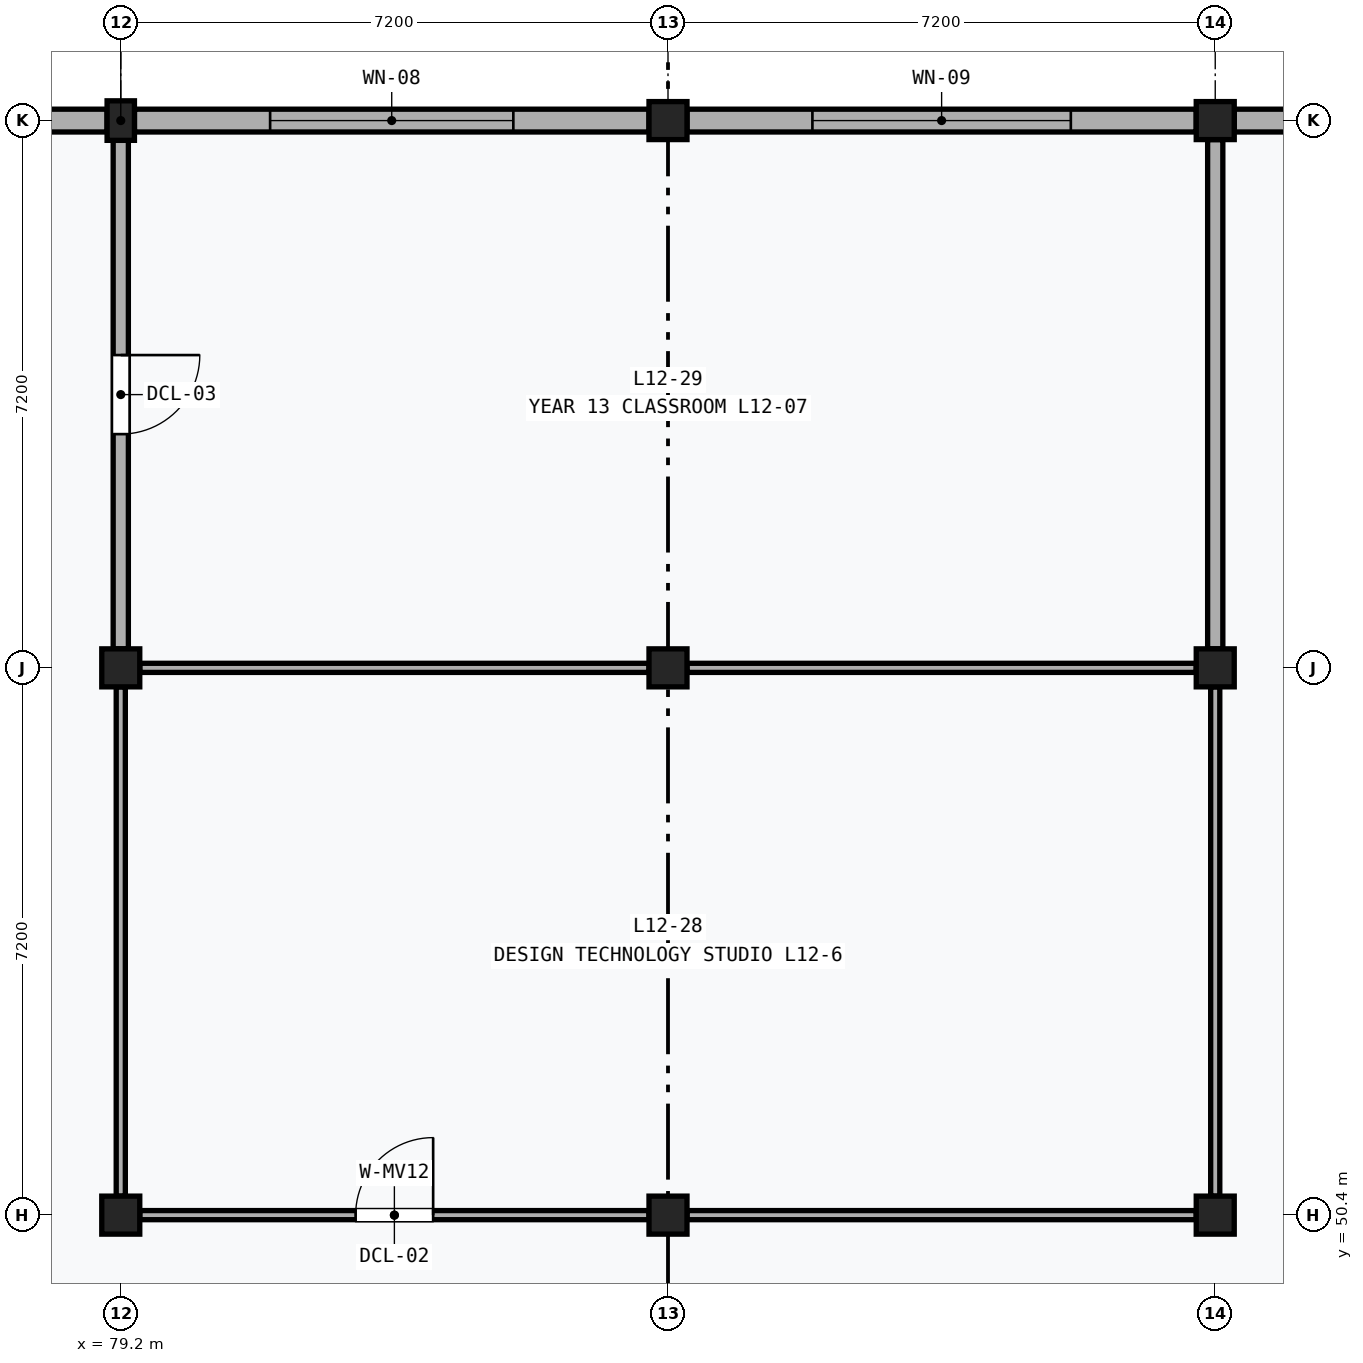
"""IFC4 building model, lengths in metres.
Left out: names, types, materials, properties, quantities, classifications, styles, units other than length and angle.
Written with IfcOpenShell. Run it as: python <this file> out.ifc"""

import sys

from ifc_helpers import new_model, si_unit, direction, frame, frame_2d, origin, origin_2d, place, context, subcontext, project, spatial, rectangle, extrude, element, fill, save


model = new_model("IFC4")
c1 = context("Model", 3, precision=1e-05, world=origin(), true_north=direction((0.0, 1.0)))
c2 = subcontext(c1, "Body", "Model", "MODEL_VIEW")
j1 = project(units=[si_unit("LENGTHUNIT", "METRE"), si_unit("PLANEANGLEUNIT", "RADIAN")], contexts=[c1])
p1 = place(None, origin())
s1 = spatial("IfcSite", under=j1, at=p1, CompositionType="ELEMENT")
p2 = place(p1, origin())
s2 = spatial("IfcBuilding", under=s1, at=p2, CompositionType="ELEMENT")
p3 = place(p2, frame((0.0, 0.0, 51.0)))
s3 = spatial("IfcBuildingStorey", under=s2, at=p3, CompositionType="ELEMENT", Elevation=51.0)
for number, where, z_axis, x_axis in (
    (1, (79.2, 50.4, 0.0), (0.0, 0.0, 1.0), (1.0, 0.0, 0.0)),
    (2, (79.2, 57.6, 0.0), (0.0, 0.0, 1.0), (1.0, 0.0, 0.0)),
):
    element("IfcColumn", number, at=place(p3, frame(where, z_axis=z_axis, x_axis=x_axis)), inside=s3, PredefinedType="COLUMN", context=c2, shape_type="SweptSolid", body=[
        extrude(rectangle(XDim=0.5, YDim=0.5, at=origin_2d()), origin(), (0.0, 0.0, 1.0), 4.0),
    ])
p4 = place(p3, frame((79.2, 64.8, 0.0), z_axis=(0.0, 0.0, 1.0), x_axis=(1.0, 0.0, 0.0)))
e3 = element("IfcColumn", 3, at=p4, inside=s3, PredefinedType="PILASTER", context=c2, shape_type="SweptSolid", body=[
    extrude(rectangle(XDim=0.36, YDim=0.52, at=origin_2d()), origin(), (0.0, 0.0, 1.0), 4.0),
])
for number, where, z_axis, x_axis in (
    (4, (86.4, 50.4, 0.0), (0.0, 0.0, 1.0), (1.0, 0.0, 0.0)),
    (5, (86.4, 57.6, 0.0), (0.0, 0.0, 1.0), (1.0, 0.0, 0.0)),
    (6, (86.4, 64.8, 0.0), (0.0, 0.0, 1.0), (1.0, 0.0, 0.0)),
    (7, (93.6, 50.4, 0.0), (0.0, 0.0, 1.0), (1.0, 0.0, 0.0)),
    (8, (93.6, 57.6, 0.0), (0.0, 0.0, 1.0), (1.0, 0.0, 0.0)),
    (9, (93.6, 64.8, 0.0), (0.0, 0.0, 1.0), (1.0, 0.0, 0.0)),
):
    element("IfcColumn", number, at=place(p3, frame(where, z_axis=z_axis, x_axis=x_axis)), inside=s3, PredefinedType="COLUMN", context=c2, shape_type="SweptSolid", body=[
        extrude(rectangle(XDim=0.5, YDim=0.5, at=origin_2d()), origin(), (0.0, 0.0, 1.0), 4.0),
    ])
p5 = place(p3, frame((72.25, 64.8, 0.0), z_axis=(0.0, 0.0, 1.0), x_axis=(1.0, 0.0, 0.0)))
e10 = element("IfcWall", 10, at=p5, inside=s3, PredefinedType="SOLIDWALL", context=c2, shape_type="SweptSolid", body=[
    extrude(rectangle(XDim=6.77, YDim=0.3, at=frame_2d((3.385, 0.0))), origin(), (0.0, 0.0, 1.0), 3.17),
])
p6 = place(p5, frame((1.885, 0.0, 0.9)))
e11 = element("IfcOpeningElement", 11, at=p6, cuts=e10, PredefinedType="OPENING", context=c2, shape_type="SweptSolid", body=[
    extrude(rectangle(XDim=3.0, YDim=1.8, at=frame_2d((1.5, 0.9))), frame((0.0, 0.162, 0.0), z_axis=(0.0, -1.0, 0.0), x_axis=(1.0, 0.0, 0.0)), (0.0, 0.0, 1.0), 0.324),
])
p7 = place(p3, frame((79.38, 64.8, 0.0), z_axis=(0.0, 0.0, 1.0), x_axis=(1.0, 0.0, 0.0)))
e12 = element("IfcWall", 12, at=p7, inside=s3, PredefinedType="SOLIDWALL", context=c2, shape_type="SweptSolid", body=[
    extrude(rectangle(XDim=6.77, YDim=0.3, at=frame_2d((3.385, 0.0))), origin(), (0.0, 0.0, 1.0), 3.17),
])
p8 = place(p7, frame((1.785, 0.0, 0.9)))
e13 = element("IfcOpeningElement", 13, at=p8, cuts=e12, PredefinedType="OPENING", context=c2, shape_type="SweptSolid", body=[
    extrude(rectangle(XDim=3.2, YDim=1.8, at=frame_2d((1.6, 0.9))), frame((0.0, 0.162, 0.0), z_axis=(0.0, -1.0, 0.0), x_axis=(1.0, 0.0, 0.0)), (0.0, 0.0, 1.0), 0.324),
])
p9 = place(p3, frame((86.65, 64.8, 0.0), z_axis=(0.0, 0.0, 1.0), x_axis=(1.0, 0.0, 0.0)))
e14 = element("IfcWall", 14, at=p9, inside=s3, PredefinedType="SOLIDWALL", context=c2, shape_type="SweptSolid", body=[
    extrude(rectangle(XDim=6.7, YDim=0.3, at=frame_2d((3.35, 0.0))), origin(), (0.0, 0.0, 1.0), 3.17),
])
p10 = place(p9, frame((1.65, 0.0, 0.9)))
e15 = element("IfcOpeningElement", 15, at=p10, cuts=e14, PredefinedType="OPENING", context=c2, shape_type="SweptSolid", body=[
    extrude(rectangle(XDim=3.4, YDim=1.8, at=frame_2d((1.7, 0.9))), frame((0.0, 0.162, 0.0), z_axis=(0.0, -1.0, 0.0), x_axis=(1.0, 0.0, 0.0)), (0.0, 0.0, 1.0), 0.324),
])
p11 = place(p3, frame((93.85, 64.8, 0.0), z_axis=(0.0, 0.0, 1.0), x_axis=(1.0, 0.0, 0.0)))
e16 = element("IfcWall", 16, at=p11, inside=s3, PredefinedType="SOLIDWALL", context=c2, shape_type="SweptSolid", body=[
    extrude(rectangle(XDim=6.7, YDim=0.3, at=frame_2d((3.35, 0.0))), origin(), (0.0, 0.0, 1.0), 3.17),
])
p12 = place(p11, frame((2.45, 0.0, 0.85)))
e17 = element("IfcOpeningElement", 17, at=p12, cuts=e16, PredefinedType="OPENING", context=c2, shape_type="SweptSolid", body=[
    extrude(rectangle(XDim=1.8, YDim=2.0, at=frame_2d((0.9, 1.0))), frame((0.0, 0.162, 0.0), z_axis=(0.0, -1.0, 0.0), x_axis=(1.0, 0.0, 0.0)), (0.0, 0.0, 1.0), 0.324),
])
p13 = place(p3, frame((79.45, 50.4, 0.0), z_axis=(0.0, 0.0, 1.0), x_axis=(1.0, 0.0, 0.0)))
e18 = element("IfcWall", 18, at=p13, inside=s3, PredefinedType="MOVABLE", context=c2, shape_type="SweptSolid", body=[
    extrude(rectangle(XDim=6.7, YDim=0.12, at=frame_2d((3.35, 0.0))), origin(), (0.0, 0.0, 1.0), 3.09),
])
p14 = place(p13, frame((2.84, 0.0, 0.0)))
e19 = element("IfcOpeningElement", 19, at=p14, cuts=e18, PredefinedType="OPENING", context=c2, shape_type="SweptSolid", body=[
    extrude(rectangle(XDim=1.02, YDim=2.12, at=frame_2d((0.51, 1.06))), frame((0.0, 0.072, 0.0), z_axis=(0.0, -1.0, 0.0), x_axis=(1.0, 0.0, 0.0)), (0.0, 0.0, 1.0), 0.144),
])
p15 = place(p3, frame((79.45, 57.6, 0.0), z_axis=(0.0, 0.0, 1.0), x_axis=(1.0, 0.0, 0.0)))
e20 = element("IfcWall", 20, at=p15, inside=s3, PredefinedType="MOVABLE", context=c2, shape_type="SweptSolid", body=[
    extrude(rectangle(XDim=6.7, YDim=0.12, at=frame_2d((3.35, 0.0))), origin(), (0.0, 0.0, 1.0), 3.09),
])
for number, where, z_axis, x_axis in (
    (21, (79.2, 50.65, 0.0), (0.0, 0.0, 1.0), (0.0, 1.0, 0.0)),
    (22, (86.65, 50.4, 0.0), (0.0, 0.0, 1.0), (1.0, 0.0, 0.0)),
    (23, (86.65, 57.6, 0.0), (0.0, 0.0, 1.0), (1.0, 0.0, 0.0)),
    (24, (93.6, 50.65, 0.0), (0.0, 0.0, 1.0), (0.0, 1.0, 0.0)),
):
    element("IfcWall", number, at=place(p3, frame(where, z_axis=z_axis, x_axis=x_axis)), inside=s3, PredefinedType="MOVABLE", context=c2, shape_type="SweptSolid", body=[
        extrude(rectangle(XDim=6.7, YDim=0.12, at=frame_2d((3.35, 0.0))), origin(), (0.0, 0.0, 1.0), 3.09),
    ])
p16 = place(p3, frame((79.2, 57.85, 0.0), z_axis=(0.0, 0.0, 1.0), x_axis=(0.0, 1.0, 0.0)))
e25 = element("IfcWall", 25, at=p16, inside=s3, PredefinedType="PARTITIONING", context=c2, shape_type="SweptSolid", body=[
    extrude(rectangle(XDim=6.69, YDim=0.2, at=frame_2d((3.345, 0.0))), origin(), (0.0, 0.0, 1.0), 3.09),
])
p17 = place(p16, frame((2.825, 0.0, 0.0)))
e26 = element("IfcOpeningElement", 26, at=p17, cuts=e25, PredefinedType="OPENING", context=c2, shape_type="SweptSolid", body=[
    extrude(rectangle(XDim=1.04, YDim=2.14, at=frame_2d((0.52, 1.07))), frame((0.0, 0.112, 0.0), z_axis=(0.0, -1.0, 0.0), x_axis=(1.0, 0.0, 0.0)), (0.0, 0.0, 1.0), 0.224),
])
p18 = place(p3, frame((93.6, 57.85, 0.0), z_axis=(0.0, 0.0, 1.0), x_axis=(0.0, 1.0, 0.0)))
e27 = element("IfcWall", 27, at=p18, inside=s3, PredefinedType="PARTITIONING", context=c2, shape_type="SweptSolid", body=[
    extrude(rectangle(XDim=6.7, YDim=0.2, at=frame_2d((3.35, 0.0))), origin(), (0.0, 0.0, 1.0), 3.09),
])
p19 = place(p8, origin())
e28 = element("IfcWindow", 28, at=p19, inside=s3, PartitioningType="SINGLE_PANEL", PredefinedType="WINDOW", context=c2, shape_type="SweptSolid", body=[
    extrude(rectangle(XDim=3.2, YDim=1.8, at=frame_2d((1.6, 0.9))), frame((0.0, 0.03, 0.0), z_axis=(0.0, -1.0, 0.0), x_axis=(1.0, 0.0, 0.0)), (0.0, 0.0, 1.0), 0.06),
])
fill(e13, e28)
p20 = place(p10, origin())
e29 = element("IfcWindow", 29, at=p20, inside=s3, PartitioningType="SINGLE_PANEL", PredefinedType="WINDOW", context=c2, shape_type="SweptSolid", body=[
    extrude(rectangle(XDim=3.4, YDim=1.8, at=frame_2d((1.7, 0.9))), frame((0.0, 0.03, 0.0), z_axis=(0.0, -1.0, 0.0), x_axis=(1.0, 0.0, 0.0)), (0.0, 0.0, 1.0), 0.06),
])
fill(e15, e29)
p21 = place(p14, origin())
e30 = element("IfcDoor", 30, at=p21, inside=s3, OperationType="SINGLE_SWING_RIGHT", PredefinedType="DOOR", context=c2, shape_type="SweptSolid", body=[
    extrude(rectangle(XDim=1.02, YDim=2.12, at=frame_2d((0.51, 1.06))), frame((0.0, 0.025, 0.0), z_axis=(0.0, -1.0, 0.0), x_axis=(1.0, 0.0, 0.0)), (0.0, 0.0, 1.0), 0.05),
])
fill(e19, e30)
p22 = place(p17, frame((1.04, 0.0, 0.0), z_axis=(0.0, 0.0, 1.0), x_axis=(-1.0, 0.0, 0.0)))
e31 = element("IfcDoor", 31, at=p22, inside=s3, OperationType="SINGLE_SWING_LEFT", PredefinedType="DOOR", context=c2, shape_type="SweptSolid", body=[
    extrude(rectangle(XDim=1.04, YDim=2.14, at=frame_2d((0.52, 1.07))), frame((0.0, 0.025, 0.0), z_axis=(0.0, -1.0, 0.0), x_axis=(1.0, 0.0, 0.0)), (0.0, 0.0, 1.0), 0.05),
])
fill(e26, e31)
save(model, sys.argv[1])
